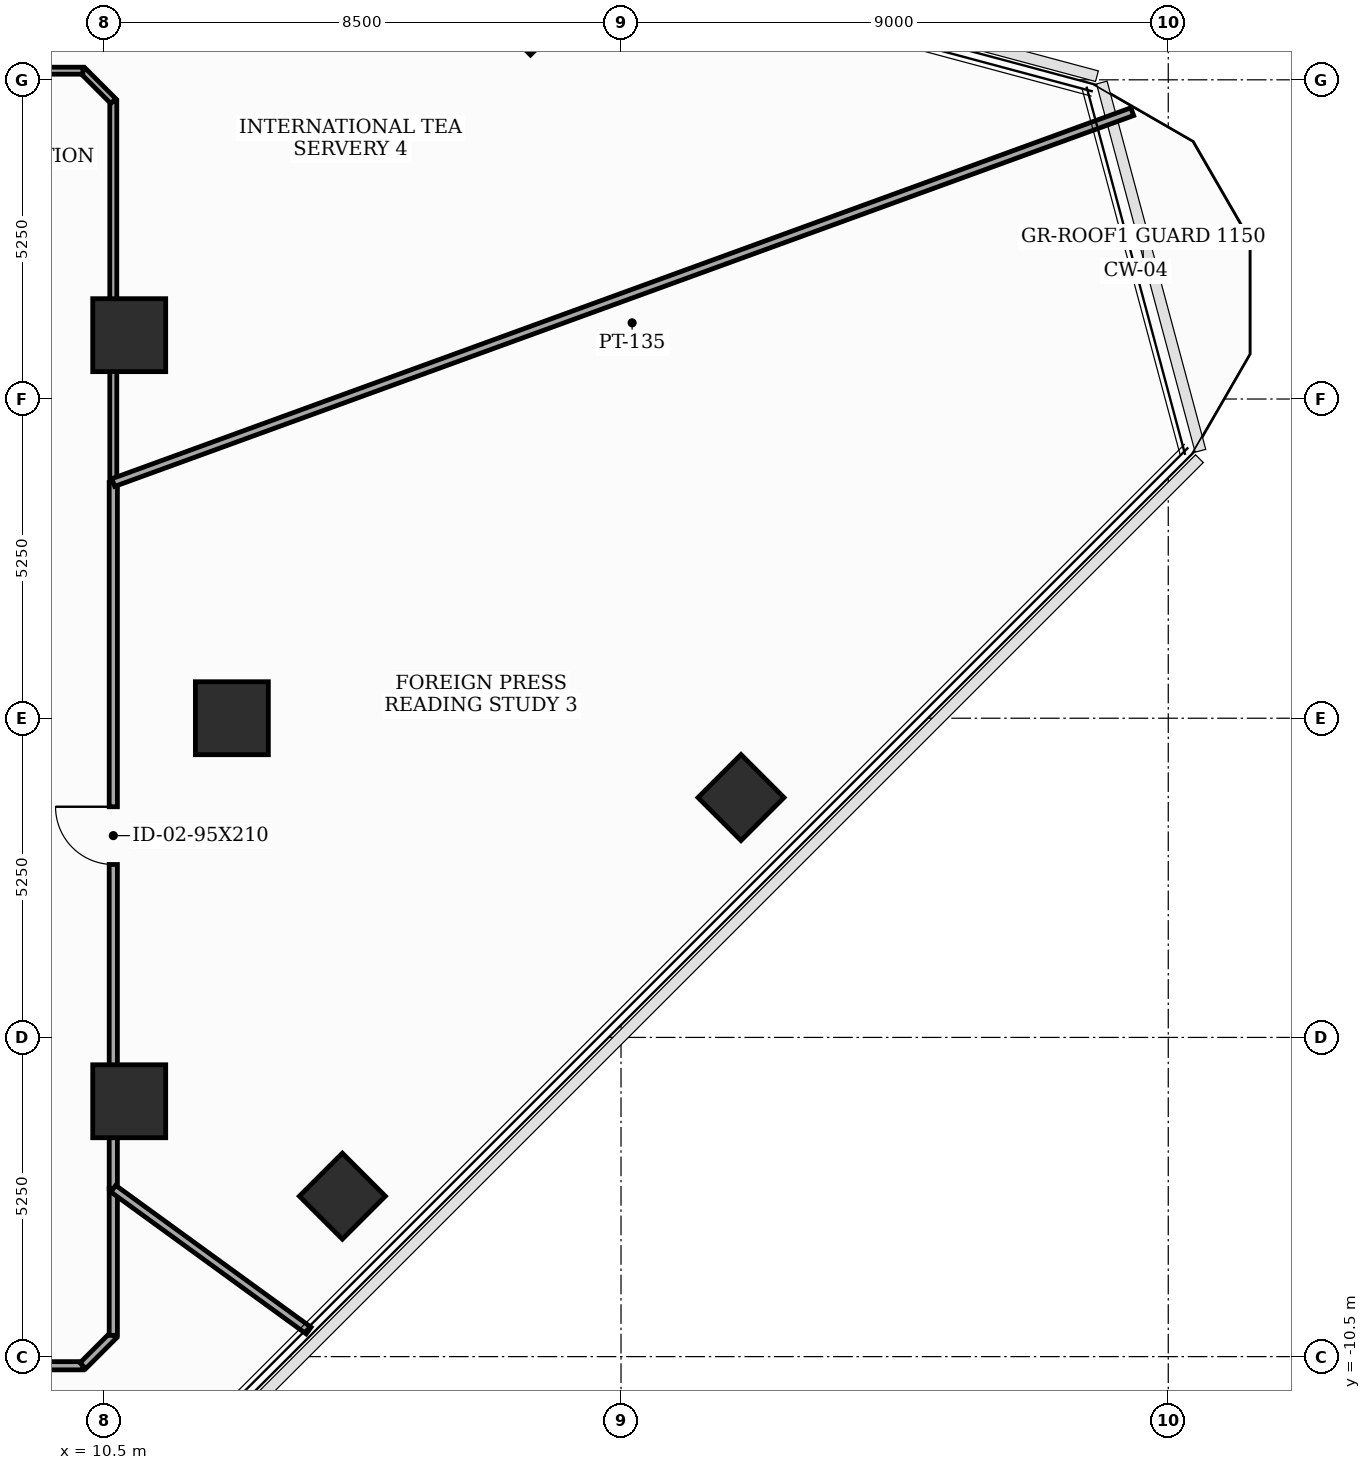
"""IFC4 building model, lengths in metres.
Left out: names, types, materials, properties, quantities, classifications, styles, units other than length and angle.
Written with IfcOpenShell. Run it as: python <this file> out.ifc"""

import sys

from ifc_helpers import new_model, si_unit, direction, frame, frame_2d, origin, origin_2d, place, context, subcontext, project, spatial, rectangle, extrude, element, fill, save


model = new_model("IFC4")
c1 = context("Model", 3, precision=1e-05, world=origin(), true_north=direction((0.0, 1.0)))
c2 = subcontext(c1, "Body", "Model", "MODEL_VIEW")
j1 = project(units=[si_unit("LENGTHUNIT", "METRE"), si_unit("PLANEANGLEUNIT", "RADIAN")], contexts=[c1])
p1 = place(None, origin())
s1 = spatial("IfcSite", under=j1, at=p1, CompositionType="ELEMENT")
p2 = place(p1, origin())
s2 = spatial("IfcBuilding", under=s1, at=p2, CompositionType="ELEMENT")
p3 = place(p2, frame((0.0, 0.0, 195.3)))
s3 = spatial("IfcBuildingStorey", under=s2, at=p3, CompositionType="ELEMENT", Elevation=195.3)
for number, where, z_axis, x_axis in (
    (1, (12.6, 0.0, 0.0), (0.0, 0.0, 1.0), (1.0, 0.0, 0.0)),
    (2, (10.912, 6.3, 0.0), (0.0, 0.0, 1.0), (1.0, 0.0, 0.0)),
    (3, (10.912, -6.3, 0.0), (0.0, 0.0, 1.0), (1.0, 0.0, 0.0)),
):
    element("IfcColumn", number, at=place(p3, frame(where, z_axis=z_axis, x_axis=x_axis)), inside=s3, PredefinedType="COLUMN", context=c2, shape_type="SweptSolid", body=[
        extrude(rectangle(XDim=1.2, YDim=1.2, at=origin_2d()), origin(), (0.0, 0.0, 1.0), 3.7),
    ])
for number, where, z_axis, x_axis in (
    (4, (14.417, -7.861, 0.0), (0.0, 0.0, 1.0), (0.707, 0.707, 0.0)),
    (5, (20.973, -1.305, 0.0), (0.0, 0.0, 1.0), (0.707, 0.707, 0.0)),
    (6, (17.511, 11.616, 0.0), (0.0, 0.0, 1.0), (0.707, 0.707, 0.0)),
):
    element("IfcColumn", number, at=place(p3, frame(where, z_axis=z_axis, x_axis=x_axis)), inside=s3, PredefinedType="COLUMN", context=c2, shape_type="SweptSolid", body=[
        extrude(rectangle(XDim=1.0, YDim=1.0, at=origin_2d()), origin(), (0.0, 0.0, 1.0), 3.7),
    ])
p4 = place(p3, frame((-4.303, -10.65, 0.0), z_axis=(0.0, 0.0, 1.0), x_axis=(1.0, 0.0, 0.0)))
e7 = element("IfcWall", 7, at=p4, inside=s3, PredefinedType="PARTITIONING", context=c2, shape_type="SweptSolid", body=[
    extrude(rectangle(XDim=14.453, YDim=0.135, at=frame_2d((7.227, 0.0))), origin(), (0.0, 0.0, 1.0), 2.885),
])
p5 = place(p4, frame((6.751, 0.0, 0.0)))
e8 = element("IfcOpeningElement", 8, at=p5, cuts=e7, PredefinedType="OPENING", context=c2, shape_type="SweptSolid", body=[
    extrude(rectangle(XDim=0.95, YDim=2.1, at=frame_2d((0.475, 1.05))), frame((0.0, 0.077, 0.0), z_axis=(0.0, -1.0, 0.0), x_axis=(1.0, 0.0, 0.0)), (0.0, 0.0, 1.0), 0.155),
])
p6 = place(p3, frame((10.15, -10.65, 0.0), z_axis=(0.0, 0.0, 1.0), x_axis=(0.707106781187, 0.707106781187, 0.0)))
e9 = element("IfcWall", 9, at=p6, inside=s3, PredefinedType="PARTITIONING", context=c2, shape_type="SweptSolid", body=[
    extrude(rectangle(XDim=0.707, YDim=0.135, at=frame_2d((0.354, 0.0))), origin(), (0.0, 0.0, 1.0), 3.5),
])
p7 = place(p3, frame((10.65, -10.15, 0.0), z_axis=(0.0, 0.0, 1.0), x_axis=(0.0, 1.0, 0.0)))
e10 = element("IfcWall", 10, at=p7, inside=s3, PredefinedType="PARTITIONING", context=c2, shape_type="SweptSolid", body=[
    extrude(rectangle(XDim=2.412, YDim=0.135, at=frame_2d((1.206, 0.0))), origin(), (0.0, 0.0, 1.0), 3.5),
])
p8 = place(p3, frame((10.65, -7.738, 0.0), z_axis=(0.0, 0.0, 1.0), x_axis=(0.0, 1.0, 0.0)))
e11 = element("IfcWall", 11, at=p8, inside=s3, PredefinedType="PARTITIONING", context=c2, shape_type="SweptSolid", body=[
    extrude(rectangle(XDim=11.614, YDim=0.135, at=frame_2d((5.807, 0.0))), origin(), (0.0, 0.0, 1.0), 2.885),
])
p9 = place(p8, frame((5.332, 0.0, 0.0)))
e12 = element("IfcOpeningElement", 12, at=p9, cuts=e11, PredefinedType="OPENING", context=c2, shape_type="SweptSolid", body=[
    extrude(rectangle(XDim=0.95, YDim=2.1, at=frame_2d((0.475, 1.05))), frame((0.0, 0.077, 0.0), z_axis=(0.0, -1.0, 0.0), x_axis=(1.0, 0.0, 0.0)), (0.0, 0.0, 1.0), 0.155),
])
p10 = place(p3, frame((10.65, 3.876, 0.0), z_axis=(0.0, 0.0, 1.0), x_axis=(0.0, 1.0, 0.0)))
e13 = element("IfcWall", 13, at=p10, inside=s3, PredefinedType="PARTITIONING", context=c2, shape_type="SweptSolid", body=[
    extrude(rectangle(XDim=6.274, YDim=0.115, at=frame_2d((3.137, 0.0))), origin(), (0.0, 0.0, 1.0), 2.885),
])
p11 = place(p3, frame((10.65, 10.15, 0.0), z_axis=(0.0, 0.0, 1.0), x_axis=(-0.707106781187, 0.707106781187, 0.0)))
e14 = element("IfcWall", 14, at=p11, inside=s3, PredefinedType="PARTITIONING", context=c2, shape_type="SweptSolid", body=[
    extrude(rectangle(XDim=0.707, YDim=0.115, at=frame_2d((0.354, 0.0))), origin(), (0.0, 0.0, 1.0), 3.5),
])
p12 = place(p3, frame((10.15, 10.65, 0.0), z_axis=(0.0, 0.0, 1.0), x_axis=(-1.0, 0.0, 0.0)))
e15 = element("IfcWall", 15, at=p12, inside=s3, PredefinedType="PARTITIONING", context=c2, shape_type="SweptSolid", body=[
    extrude(rectangle(XDim=12.414, YDim=0.115, at=frame_2d((6.207, 0.0))), origin(), (0.0, 0.0, 1.0), 2.885),
])
p13 = place(p12, frame((7.222, 0.0, 0.0)))
e16 = element("IfcOpeningElement", 16, at=p13, cuts=e15, PredefinedType="OPENING", context=c2, shape_type="SweptSolid", body=[
    extrude(rectangle(XDim=0.95, YDim=2.1, at=frame_2d((0.475, 1.05))), frame((0.0, 0.067, 0.0), z_axis=(0.0, -1.0, 0.0), x_axis=(1.0, 0.0, 0.0)), (0.0, 0.0, 1.0), 0.135),
])
p14 = place(p3, frame((13.862, -10.071, 0.0), z_axis=(0.0, 0.0, 1.0), x_axis=(-0.80911622839, 0.587648644137, 0.0)))
e17 = element("IfcWall", 17, at=p14, inside=s3, PredefinedType="PARTITIONING", context=c2, shape_type="SweptSolid", body=[
    extrude(rectangle(XDim=3.97, YDim=0.135, at=frame_2d((1.985, 0.0))), origin(), (0.0, 0.0, 1.0), 2.985),
])
p15 = place(p3, frame((27.408, 9.976, 0.0), z_axis=(0.0, 0.0, 1.0), x_axis=(-0.939687855064, -0.342033236756, 0.0)))
e18 = element("IfcWall", 18, at=p15, inside=s3, PredefinedType="PARTITIONING", context=c2, shape_type="SweptSolid", body=[
    extrude(rectangle(XDim=17.833, YDim=0.135, at=frame_2d((8.917, 0.0))), origin(), (0.0, 0.0, 1.0), 2.885),
])
p16 = place(p9, origin())
e19 = element("IfcDoor", 19, at=p16, inside=s3, OperationType="SINGLE_SWING_RIGHT", PredefinedType="DOOR", context=c2, shape_type="SweptSolid", body=[
    extrude(rectangle(XDim=0.95, YDim=2.1, at=frame_2d((0.475, 1.05))), frame((0.0, 0.025, 0.0), z_axis=(0.0, -1.0, 0.0), x_axis=(1.0, 0.0, 0.0)), (0.0, 0.0, 1.0), 0.05),
])
fill(e12, e19)
save(model, sys.argv[1])
